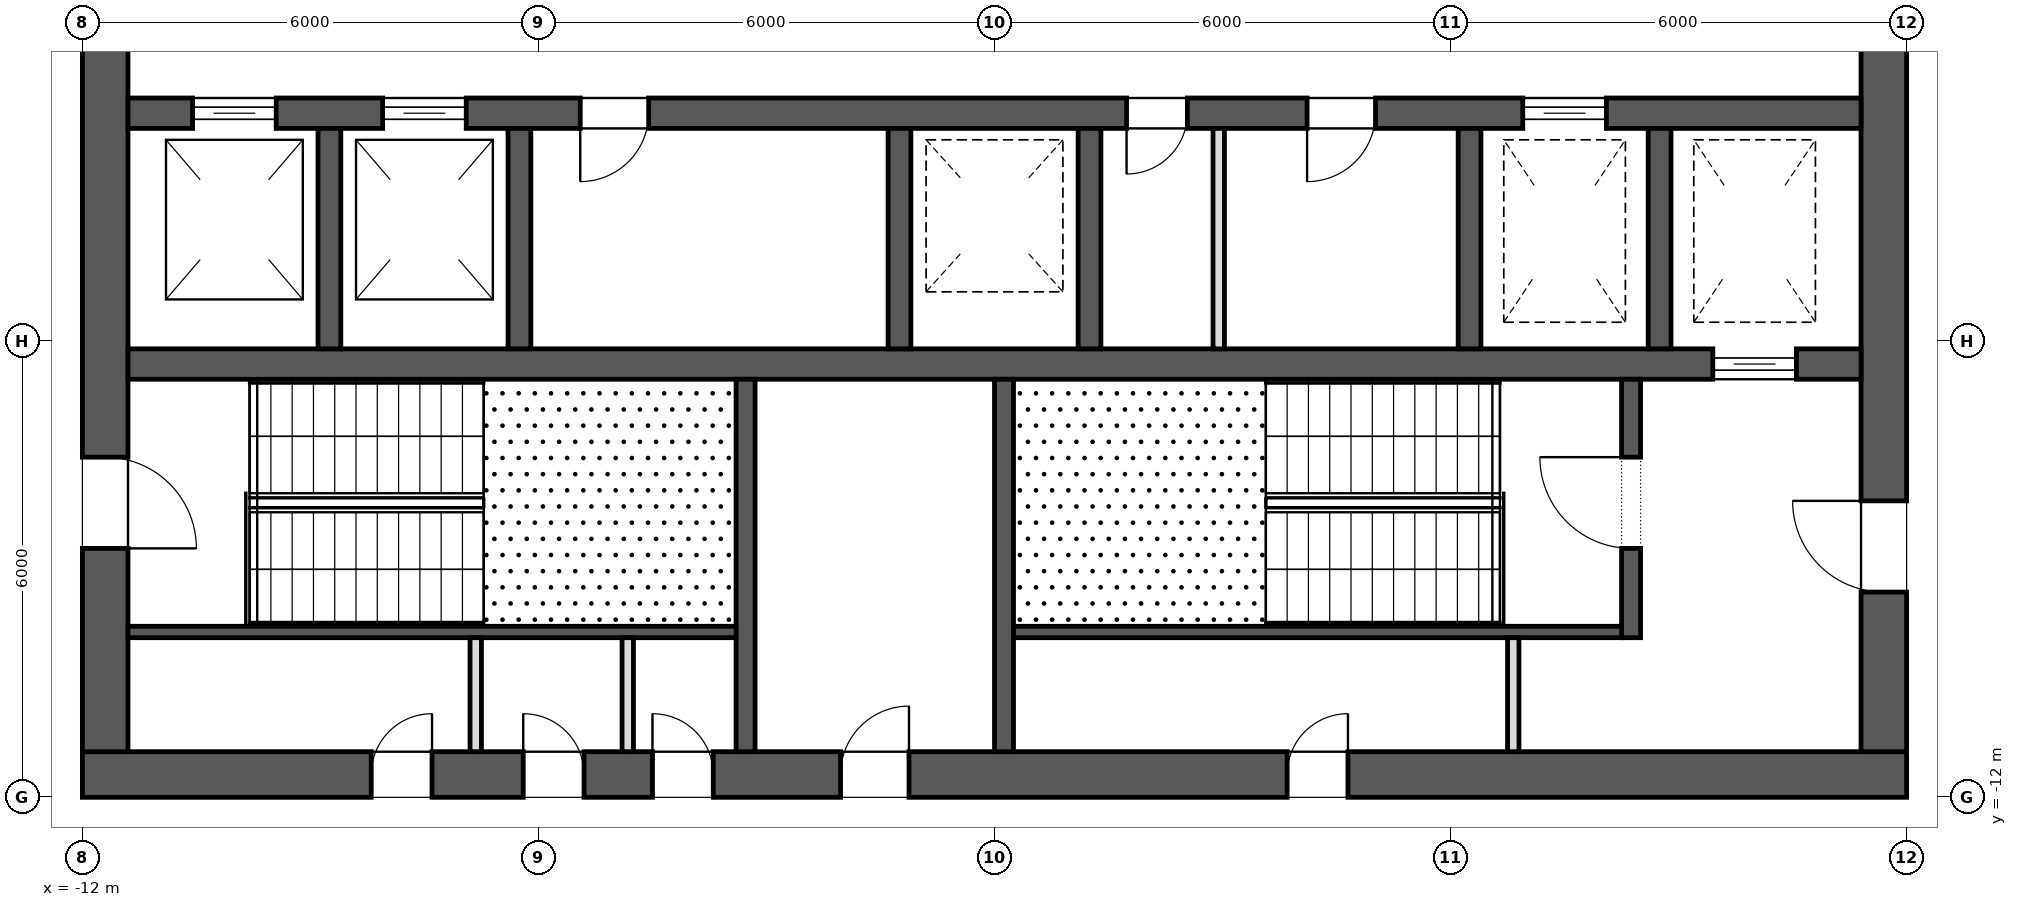
"""IFC4 building model, lengths in metres.
Left out: names, types, materials, properties, quantities, classifications, styles, units other than length and angle.
Written with IfcOpenShell. Run it as: python <this file> out.ifc"""

import sys

from ifc_helpers import new_model, si_unit, direction, frame, frame_2d, origin, place, context, subcontext, project, spatial, rectangle, extrude, element, fill, save


model = new_model("IFC4")
c1 = context("Model", 3, precision=1e-05, world=origin(), true_north=direction((0.0, 1.0)))
c2 = subcontext(c1, "Body", "Model", "MODEL_VIEW")
j1 = project(units=[si_unit("LENGTHUNIT", "METRE"), si_unit("PLANEANGLEUNIT", "RADIAN")], contexts=[c1])
p1 = place(None, origin())
s1 = spatial("IfcSite", under=j1, at=p1, CompositionType="ELEMENT")
p2 = place(p1, origin())
s2 = spatial("IfcBuilding", under=s1, at=p2, CompositionType="ELEMENT")
p3 = place(p2, frame((0.0, 0.0, 304.3)))
s3 = spatial("IfcBuildingStorey", under=s2, at=p3, CompositionType="ELEMENT", Elevation=304.3)
p4 = place(p3, frame((-12.0, -11.7, 0.0), z_axis=(0.0, 0.0, 1.0), x_axis=(1.0, 0.0, 0.0)))
e1 = element("IfcWall", 1, at=p4, inside=s3, PredefinedType="SHEAR", context=c2, shape_type="SweptSolid", body=[
    extrude(rectangle(XDim=24.0, YDim=0.6, at=frame_2d((12.0, 0.0))), origin(), (0.0, 0.0, 1.0), 4.0),
])
p5 = place(p4, frame((9.975, 0.0, 0.0)))
e2 = element("IfcOpeningElement", 2, at=p5, cuts=e1, PredefinedType="OPENING", context=c2, shape_type="SweptSolid", body=[
    extrude(rectangle(XDim=0.9, YDim=2.1, at=frame_2d((0.45, 1.05))), frame((0.0, 0.312, 0.0), z_axis=(0.0, -1.0, 0.0), x_axis=(1.0, 0.0, 0.0)), (0.0, 0.0, 1.0), 0.624),
])
p6 = place(p4, frame((3.8, 0.0, 0.0)))
e3 = element("IfcOpeningElement", 3, at=p6, cuts=e1, PredefinedType="OPENING", context=c2, shape_type="SweptSolid", body=[
    extrude(rectangle(XDim=0.8, YDim=2.1, at=frame_2d((0.4, 1.05))), frame((0.0, 0.312, 0.0), z_axis=(0.0, -1.0, 0.0), x_axis=(1.0, 0.0, 0.0)), (0.0, 0.0, 1.0), 0.624),
])
p7 = place(p4, frame((5.8, 0.0, 0.0)))
e4 = element("IfcOpeningElement", 4, at=p7, cuts=e1, PredefinedType="OPENING", context=c2, shape_type="SweptSolid", body=[
    extrude(rectangle(XDim=0.8, YDim=2.1, at=frame_2d((0.4, 1.05))), frame((0.0, 0.312, 0.0), z_axis=(0.0, -1.0, 0.0), x_axis=(1.0, 0.0, 0.0)), (0.0, 0.0, 1.0), 0.624),
])
p8 = place(p4, frame((7.5, 0.0, 0.0)))
e5 = element("IfcOpeningElement", 5, at=p8, cuts=e1, PredefinedType="OPENING", context=c2, shape_type="SweptSolid", body=[
    extrude(rectangle(XDim=0.8, YDim=2.1, at=frame_2d((0.4, 1.05))), frame((0.0, 0.312, 0.0), z_axis=(0.0, -1.0, 0.0), x_axis=(1.0, 0.0, 0.0)), (0.0, 0.0, 1.0), 0.624),
])
p9 = place(p4, frame((15.85, 0.0, 0.0)))
e6 = element("IfcOpeningElement", 6, at=p9, cuts=e1, PredefinedType="OPENING", context=c2, shape_type="SweptSolid", body=[
    extrude(rectangle(XDim=0.8, YDim=2.1, at=frame_2d((0.4, 1.05))), frame((0.0, 0.312, 0.0), z_axis=(0.0, -1.0, 0.0), x_axis=(1.0, 0.0, 0.0)), (0.0, 0.0, 1.0), 0.624),
])
p10 = place(p3, frame((11.7, -11.4, 0.0), z_axis=(0.0, 0.0, 1.0), x_axis=(0.0, 1.0, 0.0)))
e7 = element("IfcWall", 7, at=p10, inside=s3, PredefinedType="SHEAR", context=c2, shape_type="SweptSolid", body=[
    extrude(rectangle(XDim=22.8, YDim=0.6, at=frame_2d((11.4, 0.0))), origin(), (0.0, 0.0, 1.0), 4.0),
])
p11 = place(p10, frame((10.2, 0.0, 0.0)))
e8 = element("IfcOpeningElement", 8, at=p11, cuts=e7, PredefinedType="OPENING", context=c2, shape_type="SweptSolid", body=[
    extrude(rectangle(XDim=2.4, YDim=2.1, at=frame_2d((1.2, 1.05))), frame((0.0, 0.312, 0.0), z_axis=(0.0, -1.0, 0.0), x_axis=(1.0, 0.0, 0.0)), (0.0, 0.0, 1.0), 0.624),
])
p12 = place(p10, frame((19.5, 0.0, 0.0)))
e9 = element("IfcOpeningElement", 9, at=p12, cuts=e7, PredefinedType="OPENING", context=c2, shape_type="SweptSolid", body=[
    extrude(rectangle(XDim=1.2, YDim=2.1, at=frame_2d((0.6, 1.05))), frame((0.0, 0.312, 0.0), z_axis=(0.0, -1.0, 0.0), x_axis=(1.0, 0.0, 0.0)), (0.0, 0.0, 1.0), 0.624),
])
p13 = place(p10, frame((2.1, 0.0, 0.0)))
e10 = element("IfcOpeningElement", 10, at=p13, cuts=e7, PredefinedType="OPENING", context=c2, shape_type="SweptSolid", body=[
    extrude(rectangle(XDim=1.2, YDim=2.1, at=frame_2d((0.6, 1.05))), frame((0.0, 0.312, 0.0), z_axis=(0.0, -1.0, 0.0), x_axis=(1.0, 0.0, 0.0)), (0.0, 0.0, 1.0), 0.624),
])
p14 = place(p3, frame((-11.7, -11.4, 0.0), z_axis=(0.0, 0.0, 1.0), x_axis=(0.0, 1.0, 0.0)))
e11 = element("IfcWall", 11, at=p14, inside=s3, PredefinedType="SHEAR", context=c2, shape_type="SweptSolid", body=[
    extrude(rectangle(XDim=22.8, YDim=0.6, at=frame_2d((11.4, 0.0))), origin(), (0.0, 0.0, 1.0), 4.0),
])
p15 = place(p14, frame((10.2, 0.0, 0.0)))
e12 = element("IfcOpeningElement", 12, at=p15, cuts=e11, PredefinedType="OPENING", context=c2, shape_type="SweptSolid", body=[
    extrude(rectangle(XDim=2.4, YDim=2.1, at=frame_2d((1.2, 1.05))), frame((0.0, 0.312, 0.0), z_axis=(0.0, -1.0, 0.0), x_axis=(1.0, 0.0, 0.0)), (0.0, 0.0, 1.0), 0.624),
])
p16 = place(p14, frame((18.925, 0.0, 0.0)))
e13 = element("IfcOpeningElement", 13, at=p16, cuts=e11, PredefinedType="OPENING", context=c2, shape_type="SweptSolid", body=[
    extrude(rectangle(XDim=1.2, YDim=2.1, at=frame_2d((0.6, 1.05))), frame((0.0, 0.312, 0.0), z_axis=(0.0, -1.0, 0.0), x_axis=(1.0, 0.0, 0.0)), (0.0, 0.0, 1.0), 0.624),
])
p17 = place(p14, frame((2.675, 0.0, 0.0)))
e14 = element("IfcOpeningElement", 14, at=p17, cuts=e11, PredefinedType="OPENING", context=c2, shape_type="SweptSolid", body=[
    extrude(rectangle(XDim=1.2, YDim=2.1, at=frame_2d((0.6, 1.05))), frame((0.0, 0.312, 0.0), z_axis=(0.0, -1.0, 0.0), x_axis=(1.0, 0.0, 0.0)), (0.0, 0.0, 1.0), 0.624),
])
p18 = place(p3, frame((-11.4, -3.0, 0.0), z_axis=(0.0, 0.0, 1.0), x_axis=(1.0, 0.0, 0.0)))
e15 = element("IfcWall", 15, at=p18, inside=s3, PredefinedType="SHEAR", context=c2, shape_type="SweptSolid", body=[
    extrude(rectangle(XDim=22.8, YDim=0.4, at=frame_2d((11.4, 0.0))), origin(), (0.0, 0.0, 1.0), 4.0),
])
p19 = place(p18, frame((0.85, 0.0, 0.0)))
e16 = element("IfcOpeningElement", 16, at=p19, cuts=e15, PredefinedType="OPENING", context=c2, shape_type="SweptSolid", body=[
    extrude(rectangle(XDim=1.1, YDim=2.1, at=frame_2d((0.55, 1.05))), frame((0.0, 0.212, 0.0), z_axis=(0.0, -1.0, 0.0), x_axis=(1.0, 0.0, 0.0)), (0.0, 0.0, 1.0), 0.424),
])
p20 = place(p18, frame((3.35, 0.0, 0.0)))
e17 = element("IfcOpeningElement", 17, at=p20, cuts=e15, PredefinedType="OPENING", context=c2, shape_type="SweptSolid", body=[
    extrude(rectangle(XDim=1.1, YDim=2.1, at=frame_2d((0.55, 1.05))), frame((0.0, 0.212, 0.0), z_axis=(0.0, -1.0, 0.0), x_axis=(1.0, 0.0, 0.0)), (0.0, 0.0, 1.0), 0.424),
])
p21 = place(p18, frame((18.35, 0.0, 0.0)))
e18 = element("IfcOpeningElement", 18, at=p21, cuts=e15, PredefinedType="OPENING", context=c2, shape_type="SweptSolid", body=[
    extrude(rectangle(XDim=1.1, YDim=2.1, at=frame_2d((0.55, 1.05))), frame((0.0, 0.212, 0.0), z_axis=(0.0, -1.0, 0.0), x_axis=(1.0, 0.0, 0.0)), (0.0, 0.0, 1.0), 0.424),
])
p22 = place(p18, frame((13.137, 0.0, 0.0)))
e19 = element("IfcOpeningElement", 19, at=p22, cuts=e15, PredefinedType="OPENING", context=c2, shape_type="SweptSolid", body=[
    extrude(rectangle(XDim=0.8, YDim=2.1, at=frame_2d((0.4, 1.05))), frame((0.0, 0.212, 0.0), z_axis=(0.0, -1.0, 0.0), x_axis=(1.0, 0.0, 0.0)), (0.0, 0.0, 1.0), 0.424),
])
p23 = place(p18, frame((15.512, 0.0, 0.0)))
e20 = element("IfcOpeningElement", 20, at=p23, cuts=e15, PredefinedType="OPENING", context=c2, shape_type="SweptSolid", body=[
    extrude(rectangle(XDim=0.9, YDim=2.1, at=frame_2d((0.45, 1.05))), frame((0.0, 0.212, 0.0), z_axis=(0.0, -1.0, 0.0), x_axis=(1.0, 0.0, 0.0)), (0.0, 0.0, 1.0), 0.424),
])
p24 = place(p18, frame((5.95, 0.0, 0.0)))
e21 = element("IfcOpeningElement", 21, at=p24, cuts=e15, PredefinedType="OPENING", context=c2, shape_type="SweptSolid", body=[
    extrude(rectangle(XDim=0.9, YDim=2.1, at=frame_2d((0.45, 1.05))), frame((0.0, 0.212, 0.0), z_axis=(0.0, -1.0, 0.0), x_axis=(1.0, 0.0, 0.0)), (0.0, 0.0, 1.0), 0.424),
])
p25 = place(p3, frame((-11.4, -6.3, 0.0), z_axis=(0.0, 0.0, 1.0), x_axis=(1.0, 0.0, 0.0)))
e22 = element("IfcWall", 22, at=p25, inside=s3, PredefinedType="SHEAR", context=c2, shape_type="SweptSolid", body=[
    extrude(rectangle(XDim=22.8, YDim=0.4, at=frame_2d((11.4, 0.0))), origin(), (0.0, 0.0, 1.0), 4.0),
])
p26 = place(p25, frame((20.85, 0.0, 0.0)))
e23 = element("IfcOpeningElement", 23, at=p26, cuts=e22, PredefinedType="OPENING", context=c2, shape_type="SweptSolid", body=[
    extrude(rectangle(XDim=1.1, YDim=2.1, at=frame_2d((0.55, 1.05))), frame((0.0, 0.212, 0.0), z_axis=(0.0, -1.0, 0.0), x_axis=(1.0, 0.0, 0.0)), (0.0, 0.0, 1.0), 0.424),
])
for number, where, z_axis, x_axis in (
    (24, (-8.75, -6.1, 0.0), (0.0, 0.0, 1.0), (0.0, 1.0, 0.0)),
    (25, (-6.25, -6.1, 0.0), (0.0, 0.0, 1.0), (0.0, 1.0, 0.0)),
    (26, (-1.25, -6.1, 0.0), (0.0, 0.0, 1.0), (0.0, 1.0, 0.0)),
    (27, (1.25, -6.1, 0.0), (0.0, 0.0, 1.0), (0.0, 1.0, 0.0)),
    (28, (6.25, -6.1, 0.0), (0.0, 0.0, 1.0), (0.0, 1.0, 0.0)),
    (29, (8.75, -6.1, 0.0), (0.0, 0.0, 1.0), (0.0, 1.0, 0.0)),
):
    element("IfcWall", number, at=place(p3, frame(where, z_axis=z_axis, x_axis=x_axis)), inside=s3, PredefinedType="SHEAR", context=c2, shape_type="SweptSolid", body=[
        extrude(rectangle(XDim=2.9, YDim=0.3, at=frame_2d((1.45, 0.0))), origin(), (0.0, 0.0, 1.0), 4.0),
    ])
for number, where, z_axis, x_axis in (
    (30, (-3.275, -11.4, 0.0), (0.0, 0.0, 1.0), (0.0, 1.0, 0.0)),
    (31, (0.125, -11.4, 0.0), (0.0, 0.0, 1.0), (0.0, 1.0, 0.0)),
):
    element("IfcWall", number, at=place(p3, frame(where, z_axis=z_axis, x_axis=x_axis)), inside=s3, PredefinedType="SHEAR", context=c2, shape_type="SweptSolid", body=[
        extrude(rectangle(XDim=4.9, YDim=0.25, at=frame_2d((2.45, 0.0))), origin(), (0.0, 0.0, 1.0), 3.7),
    ])
p27 = place(p3, frame((8.375, -9.9, 0.0), z_axis=(0.0, 0.0, 1.0), x_axis=(0.0, 1.0, 0.0)))
e32 = element("IfcWall", 32, at=p27, inside=s3, PredefinedType="SHEAR", context=c2, shape_type="SweptSolid", body=[
    extrude(rectangle(XDim=3.4, YDim=0.25, at=frame_2d((1.7, 0.0))), origin(), (0.0, 0.0, 1.0), 3.7),
])
p28 = place(p27, frame((1.175, 0.0, 0.0)))
e33 = element("IfcOpeningElement", 33, at=p28, cuts=e32, PredefinedType="OPENING", context=c2, shape_type="SweptSolid", body=[
    extrude(rectangle(XDim=1.2, YDim=2.1, at=frame_2d((0.6, 1.05))), frame((0.0, 0.137, 0.0), z_axis=(0.0, -1.0, 0.0), x_axis=(1.0, 0.0, 0.0)), (0.0, 0.0, 1.0), 0.274),
])
for number, where, z_axis, x_axis in (
    (34, (-11.4, -9.825, 0.0), (0.0, 0.0, 1.0), (1.0, 0.0, 0.0)),
    (35, (0.25, -9.825, 0.0), (0.0, 0.0, 1.0), (1.0, 0.0, 0.0)),
):
    element("IfcWall", number, at=place(p3, frame(where, z_axis=z_axis, x_axis=x_axis)), inside=s3, PredefinedType="SHEAR", context=c2, shape_type="SweptSolid", body=[
        extrude(rectangle(XDim=8.0, YDim=0.15, at=frame_2d((4.0, 0.0))), origin(), (0.0, 0.0, 1.0), 3.7),
    ])
for number, where, z_axis, x_axis in (
    (36, (-6.825, -11.4, 0.0), (0.0, 0.0, 1.0), (0.0, 1.0, 0.0)),
    (37, (-4.825, -11.4, 0.0), (0.0, 0.0, 1.0), (0.0, 1.0, 0.0)),
    (38, (6.825, -11.4, 0.0), (0.0, 0.0, 1.0), (0.0, 1.0, 0.0)),
):
    element("IfcWall", number, at=place(p3, frame(where, z_axis=z_axis, x_axis=x_axis)), inside=s3, PredefinedType="PARTITIONING", context=c2, shape_type="SweptSolid", body=[
        extrude(rectangle(XDim=1.5, YDim=0.15, at=frame_2d((0.75, 0.0))), origin(), (0.0, 0.0, 1.0), 3.7),
    ])
p29 = place(p3, frame((2.95, -6.1, 0.0), z_axis=(0.0, 0.0, 1.0), x_axis=(0.0, 1.0, 0.0)))
e39 = element("IfcWall", 39, at=p29, inside=s3, PredefinedType="PARTITIONING", context=c2, shape_type="SweptSolid", body=[
    extrude(rectangle(XDim=2.9, YDim=0.15, at=frame_2d((1.45, 0.0))), origin(), (0.0, 0.0, 1.0), 3.7),
])
p30 = place(p26, origin())
e40 = element("IfcDoor", 40, at=p30, inside=s3, OperationType="SLIDING_TO_LEFT", PredefinedType="DOOR", context=c2, shape_type="SweptSolid", body=[
    extrude(rectangle(XDim=1.1, YDim=2.1, at=frame_2d((0.55, 1.05))), frame((0.0, 0.025, 0.0), z_axis=(0.0, -1.0, 0.0), x_axis=(1.0, 0.0, 0.0)), (0.0, 0.0, 1.0), 0.05),
])
fill(e23, e40)
p31 = place(p19, origin())
e41 = element("IfcDoor", 41, at=p31, inside=s3, OperationType="SLIDING_TO_LEFT", PredefinedType="DOOR", context=c2, shape_type="SweptSolid", body=[
    extrude(rectangle(XDim=1.1, YDim=2.1, at=frame_2d((0.55, 1.05))), frame((0.0, 0.025, 0.0), z_axis=(0.0, -1.0, 0.0), x_axis=(1.0, 0.0, 0.0)), (0.0, 0.0, 1.0), 0.05),
])
fill(e16, e41)
p32 = place(p20, origin())
e42 = element("IfcDoor", 42, at=p32, inside=s3, OperationType="SLIDING_TO_LEFT", PredefinedType="DOOR", context=c2, shape_type="SweptSolid", body=[
    extrude(rectangle(XDim=1.1, YDim=2.1, at=frame_2d((0.55, 1.05))), frame((0.0, 0.025, 0.0), z_axis=(0.0, -1.0, 0.0), x_axis=(1.0, 0.0, 0.0)), (0.0, 0.0, 1.0), 0.05),
])
fill(e17, e42)
p33 = place(p21, origin())
e43 = element("IfcDoor", 43, at=p33, inside=s3, OperationType="SLIDING_TO_LEFT", PredefinedType="DOOR", context=c2, shape_type="SweptSolid", body=[
    extrude(rectangle(XDim=1.1, YDim=2.1, at=frame_2d((0.55, 1.05))), frame((0.0, 0.025, 0.0), z_axis=(0.0, -1.0, 0.0), x_axis=(1.0, 0.0, 0.0)), (0.0, 0.0, 1.0), 0.05),
])
fill(e18, e43)
p34 = place(p17, frame((1.2, 0.0, 0.0), z_axis=(0.0, 0.0, 1.0), x_axis=(-1.0, 0.0, 0.0)))
e44 = element("IfcDoor", 44, at=p34, inside=s3, OperationType="SINGLE_SWING_LEFT", PredefinedType="DOOR", context=c2, shape_type="SweptSolid", body=[
    extrude(rectangle(XDim=1.2, YDim=2.1, at=frame_2d((0.6, 1.05))), frame((0.0, 0.025, 0.0), z_axis=(0.0, -1.0, 0.0), x_axis=(1.0, 0.0, 0.0)), (0.0, 0.0, 1.0), 0.05),
])
fill(e14, e44)
p35 = place(p28, origin())
e45 = element("IfcDoor", 45, at=p35, inside=s3, OperationType="SINGLE_SWING_LEFT", PredefinedType="DOOR", context=c2, shape_type="SweptSolid", body=[
    extrude(rectangle(XDim=1.2, YDim=2.1, at=frame_2d((0.6, 1.05))), frame((0.0, 0.025, 0.0), z_axis=(0.0, -1.0, 0.0), x_axis=(1.0, 0.0, 0.0)), (0.0, 0.0, 1.0), 0.05),
])
fill(e33, e45)
p36 = place(p13, origin())
e46 = element("IfcDoor", 46, at=p36, inside=s3, OperationType="SINGLE_SWING_LEFT", PredefinedType="DOOR", context=c2, shape_type="SweptSolid", body=[
    extrude(rectangle(XDim=1.2, YDim=2.1, at=frame_2d((0.6, 1.05))), frame((0.0, 0.025, 0.0), z_axis=(0.0, -1.0, 0.0), x_axis=(1.0, 0.0, 0.0)), (0.0, 0.0, 1.0), 0.05),
])
fill(e10, e46)
p37 = place(p5, origin())
e47 = element("IfcDoor", 47, at=p37, inside=s3, OperationType="SINGLE_SWING_LEFT", PredefinedType="DOOR", context=c2, shape_type="SweptSolid", body=[
    extrude(rectangle(XDim=0.9, YDim=2.1, at=frame_2d((0.45, 1.05))), frame((0.0, 0.025, 0.0), z_axis=(0.0, -1.0, 0.0), x_axis=(1.0, 0.0, 0.0)), (0.0, 0.0, 1.0), 0.05),
])
fill(e2, e47)
p38 = place(p6, origin())
e48 = element("IfcDoor", 48, at=p38, inside=s3, OperationType="SINGLE_SWING_LEFT", PredefinedType="DOOR", context=c2, shape_type="SweptSolid", body=[
    extrude(rectangle(XDim=0.8, YDim=2.1, at=frame_2d((0.4, 1.05))), frame((0.0, 0.025, 0.0), z_axis=(0.0, -1.0, 0.0), x_axis=(1.0, 0.0, 0.0)), (0.0, 0.0, 1.0), 0.05),
])
fill(e3, e48)
p39 = place(p7, origin())
e49 = element("IfcDoor", 49, at=p39, inside=s3, OperationType="SINGLE_SWING_RIGHT", PredefinedType="DOOR", context=c2, shape_type="SweptSolid", body=[
    extrude(rectangle(XDim=0.8, YDim=2.1, at=frame_2d((0.4, 1.05))), frame((0.0, 0.025, 0.0), z_axis=(0.0, -1.0, 0.0), x_axis=(1.0, 0.0, 0.0)), (0.0, 0.0, 1.0), 0.05),
])
fill(e4, e49)
p40 = place(p8, origin())
e50 = element("IfcDoor", 50, at=p40, inside=s3, OperationType="SINGLE_SWING_RIGHT", PredefinedType="DOOR", context=c2, shape_type="SweptSolid", body=[
    extrude(rectangle(XDim=0.8, YDim=2.1, at=frame_2d((0.4, 1.05))), frame((0.0, 0.025, 0.0), z_axis=(0.0, -1.0, 0.0), x_axis=(1.0, 0.0, 0.0)), (0.0, 0.0, 1.0), 0.05),
])
fill(e5, e50)
p41 = place(p9, origin())
e51 = element("IfcDoor", 51, at=p41, inside=s3, OperationType="SINGLE_SWING_LEFT", PredefinedType="DOOR", context=c2, shape_type="SweptSolid", body=[
    extrude(rectangle(XDim=0.8, YDim=2.1, at=frame_2d((0.4, 1.05))), frame((0.0, 0.025, 0.0), z_axis=(0.0, -1.0, 0.0), x_axis=(1.0, 0.0, 0.0)), (0.0, 0.0, 1.0), 0.05),
])
fill(e6, e51)
p42 = place(p22, frame((0.8, 0.0, 0.0), z_axis=(0.0, 0.0, 1.0), x_axis=(-1.0, 0.0, 0.0)))
e52 = element("IfcDoor", 52, at=p42, inside=s3, OperationType="SINGLE_SWING_LEFT", PredefinedType="DOOR", context=c2, shape_type="SweptSolid", body=[
    extrude(rectangle(XDim=0.8, YDim=2.1, at=frame_2d((0.4, 1.05))), frame((0.0, 0.025, 0.0), z_axis=(0.0, -1.0, 0.0), x_axis=(1.0, 0.0, 0.0)), (0.0, 0.0, 1.0), 0.05),
])
fill(e19, e52)
p43 = place(p23, frame((0.9, 0.0, 0.0), z_axis=(0.0, 0.0, 1.0), x_axis=(-1.0, 0.0, 0.0)))
e53 = element("IfcDoor", 53, at=p43, inside=s3, OperationType="SINGLE_SWING_LEFT", PredefinedType="DOOR", context=c2, shape_type="SweptSolid", body=[
    extrude(rectangle(XDim=0.9, YDim=2.1, at=frame_2d((0.45, 1.05))), frame((0.0, 0.025, 0.0), z_axis=(0.0, -1.0, 0.0), x_axis=(1.0, 0.0, 0.0)), (0.0, 0.0, 1.0), 0.05),
])
fill(e20, e53)
p44 = place(p24, frame((0.9, 0.0, 0.0), z_axis=(0.0, 0.0, 1.0), x_axis=(-1.0, 0.0, 0.0)))
e54 = element("IfcDoor", 54, at=p44, inside=s3, OperationType="SINGLE_SWING_LEFT", PredefinedType="DOOR", context=c2, shape_type="SweptSolid", body=[
    extrude(rectangle(XDim=0.9, YDim=2.1, at=frame_2d((0.45, 1.05))), frame((0.0, 0.025, 0.0), z_axis=(0.0, -1.0, 0.0), x_axis=(1.0, 0.0, 0.0)), (0.0, 0.0, 1.0), 0.05),
])
fill(e21, e54)
save(model, sys.argv[1])
